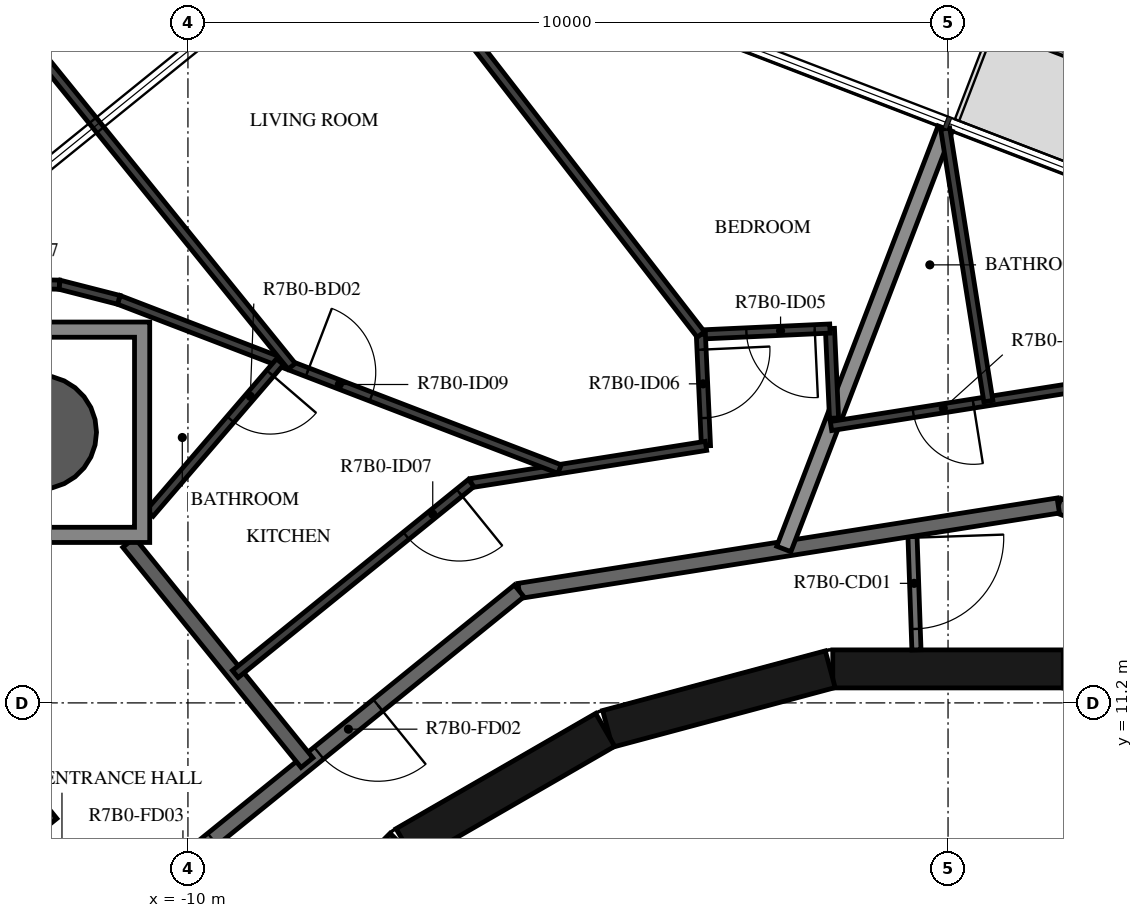
"""IFC4 building model, lengths in metres.
Left out: names, types, materials, properties, quantities, classifications, styles, units other than length and angle.
Written with IfcOpenShell. Run it as: python <this file> out.ifc"""

import sys

from ifc_helpers import new_model, si_unit, direction, frame, frame_2d, origin, origin_2d, place, context, subcontext, project, spatial, polyline, rectangle, hollow_circle, outline, extrude, element, fill, save


model = new_model("IFC4")
c1 = context("Model", 3, precision=1e-05, world=origin(), true_north=direction((0.0, 1.0)))
c2 = subcontext(c1, "Body", "Model", "MODEL_VIEW")
j1 = project(units=[si_unit("LENGTHUNIT", "METRE"), si_unit("PLANEANGLEUNIT", "RADIAN")], contexts=[c1])
p1 = place(None, origin())
s1 = spatial("IfcSite", under=j1, at=p1, CompositionType="ELEMENT")
p2 = place(p1, origin())
s2 = spatial("IfcBuilding", under=s1, at=p2, CompositionType="ELEMENT")
p3 = place(p2, frame((0.0, 0.0, 277.4)))
s3 = spatial("IfcBuildingStorey", under=s2, at=p3, CompositionType="ELEMENT", Elevation=277.4)
p4 = place(p3, frame((-11.953, 14.76, -0.38), z_axis=(0.0, 0.0, 1.0), x_axis=(1.0, 0.0, 0.0)))
e1 = element("IfcColumn", 1, at=p4, inside=s3, PredefinedType="COLUMN", context=c2, shape_type="SweptSolid", body=[
    extrude(hollow_circle(Radius=0.75, WallThickness=0.035, at=origin_2d()), origin(), (0.0, 0.0, 1.0), 3.5),
])
p5 = place(p3, frame((4.479, 10.858, 0.0), z_axis=(0.0, 0.0, 1.0), x_axis=(-0.965948410781, 0.258734743916, 0.0)))
e2 = element("IfcWall", 2, at=p5, inside=s3, PredefinedType="SHEAR", context=c2, shape_type="SweptSolid", body=[
    extrude(rectangle(XDim=3.033, YDim=0.5, at=frame_2d((1.516, 0.0))), origin(), (0.0, 0.0, 1.0), 3.12),
])
p6 = place(p5, frame((1.066, 0.0, 0.0)))
e3 = element("IfcOpeningElement", 3, at=p6, cuts=e2, PredefinedType="OPENING", context=c2, shape_type="SweptSolid", body=[
    extrude(rectangle(XDim=0.9, YDim=2.1, at=frame_2d((0.45, 1.05))), frame((0.0, 0.26, 0.0), z_axis=(0.0, -1.0, 0.0), x_axis=(1.0, 0.0, 0.0)), (0.0, 0.0, 1.0), 0.52),
])
for number, where, z_axis, x_axis in (
    (4, (1.516, 11.647, 0.0), (0.0, 0.0, 1.0), (-1.0, 0.0, 0.0)),
    (5, (-1.55, 11.643, 0.0), (0.0, 0.0, 1.0), (-0.966, -0.259, 0.0)),
    (6, (-4.51, 10.845, 0.0), (0.0, 0.0, 1.0), (-0.866, -0.5, 0.0)),
):
    element("IfcWall", number, at=place(p3, frame(where, z_axis=z_axis, x_axis=x_axis)), inside=s3, PredefinedType="SHEAR", context=c2, shape_type="SweptSolid", body=[
        extrude(rectangle(XDim=3.033, YDim=0.5, at=frame_2d((1.516, 0.0))), origin(), (0.0, 0.0, 1.0), 3.12),
    ])
p7 = place(p3, frame((-7.164, 9.308, 0.0), z_axis=(0.0, 0.0, 1.0), x_axis=(-0.707106781187, -0.707106781187, 0.0)))
e7 = element("IfcWall", 7, at=p7, inside=s3, PredefinedType="SHEAR", context=c2, shape_type="SweptSolid", body=[
    extrude(rectangle(XDim=3.032, YDim=0.5, at=frame_2d((1.516, 0.0))), origin(), (0.0, 0.0, 1.0), 3.12),
])
p8 = place(p7, frame((1.416, 0.0, 0.0)))
e8 = element("IfcOpeningElement", 8, at=p8, cuts=e7, PredefinedType="OPENING", context=c2, shape_type="SweptSolid", body=[
    extrude(rectangle(XDim=1.2, YDim=2.1, at=frame_2d((0.6, 1.05))), frame((0.0, 0.26, 0.0), z_axis=(0.0, -1.0, 0.0), x_axis=(1.0, 0.0, 0.0)), (0.0, 0.0, 1.0), 0.52),
])
p9 = place(p3, frame((-0.471, 13.492, 0.0), z_axis=(0.0, 0.0, 1.0), x_axis=(0.034873173869, -0.999391745886, 0.0)))
e9 = element("IfcWall", 9, at=p9, inside=s3, PredefinedType="PARTITIONING", context=c2, shape_type="SweptSolid", body=[
    extrude(rectangle(XDim=1.596, YDim=0.12, at=frame_2d((0.798, 0.0))), origin(), (0.0, 0.0, 1.0), 3.12),
])
p10 = place(p9, frame((0.12, 0.0, 0.0)))
e10 = element("IfcOpeningElement", 10, at=p10, cuts=e9, PredefinedType="OPENING", context=c2, shape_type="SweptSolid", body=[
    extrude(rectangle(XDim=1.2, YDim=2.1, at=frame_2d((0.6, 1.05))), frame((0.0, 0.07, 0.0), z_axis=(0.0, -1.0, 0.0), x_axis=(1.0, 0.0, 0.0)), (0.0, 0.0, 1.0), 0.14),
])
p11 = place(p3, frame((8.154, 11.223, 0.0), z_axis=(0.0, 0.0, 1.0), x_axis=(-0.93359073609, 0.358341090983, 0.0)))
e11 = element("IfcWall", 11, at=p11, inside=s3, PredefinedType="STANDARD", context=c2, shape_type="SweptSolid", body=[
    extrude(rectangle(XDim=7.181, YDim=0.2, at=frame_2d((3.59, 0.0))), origin(), (0.0, 0.0, 1.0), 3.12),
])
p12 = place(p3, frame((1.45, 13.797, 0.0), z_axis=(0.0, 0.0, 1.0), x_axis=(-0.987690361611, -0.156421704315, 0.0)))
e12 = element("IfcWall", 12, at=p12, inside=s3, PredefinedType="STANDARD", context=c2, shape_type="SweptSolid", body=[
    extrude(rectangle(XDim=7.181, YDim=0.2, at=frame_2d((3.591, 0.0))), origin(), (0.0, 0.0, 1.0), 3.12),
])
p13 = place(p3, frame((-5.643, 12.673, 0.0), z_axis=(0.0, 0.0, 1.0), x_axis=(-0.777160148113, -0.629302871585, 0.0)))
e13 = element("IfcWall", 13, at=p13, inside=s3, PredefinedType="STANDARD", context=c2, shape_type="SweptSolid", body=[
    extrude(rectangle(XDim=7.181, YDim=0.2, at=frame_2d((3.59, 0.0))), origin(), (0.0, 0.0, 1.0), 3.12),
])
p14 = place(p13, frame((2.39, 0.0, 0.0)))
e14 = element("IfcOpeningElement", 14, at=p14, cuts=e13, PredefinedType="OPENING", context=c2, shape_type="SweptSolid", body=[
    extrude(rectangle(XDim=1.0, YDim=2.1, at=frame_2d((0.5, 1.05))), frame((0.0, 0.11, 0.0), z_axis=(0.0, -1.0, 0.0), x_axis=(1.0, 0.0, 0.0)), (0.0, 0.0, 1.0), 0.22),
])
p15 = place(p13, frame((5.192, 0.0, 0.0)))
e15 = element("IfcOpeningElement", 15, at=p15, cuts=e13, PredefinedType="OPENING", context=c2, shape_type="SweptSolid", body=[
    extrude(rectangle(XDim=1.0, YDim=2.1, at=frame_2d((0.5, 1.05))), frame((0.0, 0.11, 0.0), z_axis=(0.0, -1.0, 0.0), x_axis=(1.0, 0.0, 0.0)), (0.0, 0.0, 1.0), 0.22),
])
p16 = place(p3, frame((-0.037, 18.756, 0.0), z_axis=(0.0, 0.0, 1.0), x_axis=(-0.358365943542, -0.933581196527, 0.0)))
e16 = element("IfcWall", 16, at=p16, inside=s3, PredefinedType="STANDARD", context=c2, shape_type="SweptSolid", body=[
    extrude(rectangle(XDim=5.924, YDim=0.2, at=frame_2d((2.962, 0.0))), origin(), (0.0, 0.0, 1.0), 2.73),
])
p17 = place(p3, frame((-10.779, 13.31, 0.0), z_axis=(0.0, 0.0, 1.0), x_axis=(0.62931692753, -0.777148766147, 0.0)))
e17 = element("IfcWall", 17, at=p17, inside=s3, PredefinedType="STANDARD", context=c2, shape_type="SweptSolid", body=[
    extrude(rectangle(XDim=3.727, YDim=0.2, at=frame_2d((1.864, 0.0))), origin(), (0.0, 0.0, 1.0), 3.12),
])
p18 = place(p3, frame((1.612, 15.341, 0.0), z_axis=(0.0, 0.0, 1.0), x_axis=(-0.987687176419, -0.156441815179, 0.0)))
e18 = element("IfcWall", 18, at=p18, inside=s3, PredefinedType="PARTITIONING", context=c2, shape_type="SweptSolid", body=[
    extrude(rectangle(XDim=3.191, YDim=0.12, at=frame_2d((1.596, 0.0))), origin(), (0.0, 0.0, 1.0), 3.12),
])
p19 = place(p18, frame((1.295, 0.0, 0.0)))
e19 = element("IfcOpeningElement", 19, at=p19, cuts=e18, PredefinedType="OPENING", context=c2, shape_type="SweptSolid", body=[
    extrude(rectangle(XDim=0.8, YDim=2.1, at=frame_2d((0.4, 1.05))), frame((0.0, 0.07, 0.0), z_axis=(0.0, -1.0, 0.0), x_axis=(1.0, 0.0, 0.0)), (0.0, 0.0, 1.0), 0.14),
])
p20 = place(p3, frame((-0.037, 18.756, 0.0), z_axis=(0.0, 0.0, 1.0), x_axis=(0.156421851095, -0.987690338365, 0.0)))
e20 = element("IfcWall", 20, at=p20, inside=s3, PredefinedType="PARTITIONING", context=c2, shape_type="SweptSolid", body=[
    extrude(rectangle(XDim=3.63, YDim=0.12, at=frame_2d((1.815, 0.0))), origin(), (0.0, 0.0, 1.0), 3.12),
])
p21 = place(p3, frame((-1.5, 14.946, 0.0), z_axis=(0.0, 0.0, 1.0), x_axis=(-0.045923747874, 0.998944948123, 0.0)))
e21 = element("IfcWall", 21, at=p21, inside=s3, PredefinedType="PARTITIONING", context=c2, shape_type="SweptSolid", body=[
    extrude(rectangle(XDim=1.18, YDim=0.12, at=frame_2d((0.59, 0.0))), origin(), (0.0, 0.0, 1.0), 3.12),
])
p22 = place(p3, frame((-1.554, 16.125, 0.0), z_axis=(0.0, 0.0, 1.0), x_axis=(-0.998943517875, -0.045954848436, 0.0)))
e22 = element("IfcWall", 22, at=p22, inside=s3, PredefinedType="PARTITIONING", context=c2, shape_type="SweptSolid", body=[
    extrude(rectangle(XDim=1.7, YDim=0.12, at=frame_2d((0.85, 0.0))), origin(), (0.0, 0.0, 1.0), 3.12),
])
p23 = place(p22, frame((0.2, 0.0, 0.0)))
e23 = element("IfcOpeningElement", 23, at=p23, cuts=e22, PredefinedType="OPENING", context=c2, shape_type="SweptSolid", body=[
    extrude(rectangle(XDim=0.9, YDim=2.1, at=frame_2d((0.45, 1.05))), frame((0.0, 0.07, 0.0), z_axis=(0.0, -1.0, 0.0), x_axis=(1.0, 0.0, 0.0)), (0.0, 0.0, 1.0), 0.14),
])
p24 = place(p3, frame((-3.252, 16.047, 0.0), z_axis=(0.0, 0.0, 1.0), x_axis=(0.045928493331, -0.998944729953, 0.0)))
e24 = element("IfcWall", 24, at=p24, inside=s3, PredefinedType="PARTITIONING", context=c2, shape_type="SweptSolid", body=[
    extrude(rectangle(XDim=1.467, YDim=0.12, at=frame_2d((0.733, 0.0))), origin(), (0.0, 0.0, 1.0), 3.12),
])
p25 = place(p24, frame((0.2, 0.0, 0.0)))
e25 = element("IfcOpeningElement", 25, at=p25, cuts=e24, PredefinedType="OPENING", context=c2, shape_type="SweptSolid", body=[
    extrude(rectangle(XDim=0.9, YDim=2.1, at=frame_2d((0.45, 1.05))), frame((0.0, 0.07, 0.0), z_axis=(0.0, -1.0, 0.0), x_axis=(1.0, 0.0, 0.0)), (0.0, 0.0, 1.0), 0.14),
])
p26 = place(p3, frame((-3.185, 14.581, 0.0), z_axis=(0.0, 0.0, 1.0), x_axis=(-0.987690712769, -0.156419486991, 0.0)))
e26 = element("IfcWall", 26, at=p26, inside=s3, PredefinedType="PARTITIONING", context=c2, shape_type="SweptSolid", body=[
    extrude(rectangle(XDim=3.128, YDim=0.12, at=frame_2d((1.564, 0.0))), origin(), (0.0, 0.0, 1.0), 3.12),
])
p27 = place(p3, frame((-6.274, 14.092, 0.0), z_axis=(0.0, 0.0, 1.0), x_axis=(-0.777162268892, -0.629300252511, 0.0)))
e27 = element("IfcWall", 27, at=p27, inside=s3, PredefinedType="PARTITIONING", context=c2, shape_type="SweptSolid", body=[
    extrude(rectangle(XDim=3.992, YDim=0.12, at=frame_2d((1.996, 0.0))), origin(), (0.0, 0.0, 1.0), 3.12),
])
p28 = place(p27, frame((0.2, 0.0, 0.0)))
e28 = element("IfcOpeningElement", 28, at=p28, cuts=e27, PredefinedType="OPENING", context=c2, shape_type="SweptSolid", body=[
    extrude(rectangle(XDim=0.9, YDim=2.1, at=frame_2d((0.45, 1.05))), frame((0.0, 0.07, 0.0), z_axis=(0.0, -1.0, 0.0), x_axis=(1.0, 0.0, 0.0)), (0.0, 0.0, 1.0), 0.14),
])
p29 = place(p3, frame((-7.606, 21.661, 0.0), z_axis=(0.0, 0.0, 1.0), x_axis=(0.612852858705, -0.79019704731, 0.0)))
e29 = element("IfcWall", 29, at=p29, inside=s3, PredefinedType="PARTITIONING", context=c2, shape_type="SweptSolid", body=[
    extrude(rectangle(XDim=7.105, YDim=0.12, at=frame_2d((3.552, 0.0))), origin(), (0.0, 0.0, 1.0), 3.12),
])
p30 = place(p3, frame((-10.91, 16.502, 0.0), z_axis=(0.0, 0.0, 1.0), x_axis=(0.933584453869, -0.358357457707, 0.0)))
e30 = element("IfcWall", 30, at=p30, inside=s3, PredefinedType="PARTITIONING", context=c2, shape_type="SweptSolid", body=[
    extrude(rectangle(XDim=6.212, YDim=0.12, at=frame_2d((3.106, 0.0))), origin(), (0.0, 0.0, 1.0), 3.12),
])
p31 = place(p30, frame((2.657, 0.0, 0.0)))
e31 = element("IfcOpeningElement", 31, at=p31, cuts=e30, PredefinedType="OPENING", context=c2, shape_type="SweptSolid", body=[
    extrude(rectangle(XDim=0.9, YDim=2.1, at=frame_2d((0.45, 1.05))), frame((0.0, 0.07, 0.0), z_axis=(0.0, -1.0, 0.0), x_axis=(1.0, 0.0, 0.0)), (0.0, 0.0, 1.0), 0.14),
])
p32 = place(p3, frame((-14.132, 22.418, 0.0), z_axis=(0.0, 0.0, 1.0), x_axis=(0.629309172704, -0.77715504576, 0.0)))
e32 = element("IfcWall", 32, at=p32, inside=s3, PredefinedType="PARTITIONING", context=c2, shape_type="SweptSolid", body=[
    extrude(rectangle(XDim=8.736, YDim=0.12, at=frame_2d((4.368, 0.0))), origin(), (0.0, 0.0, 1.0), 3.12),
])
p33 = place(p32, frame((0.4, 0.0, 0.0)))
e33 = element("IfcOpeningElement", 33, at=p33, cuts=e32, PredefinedType="OPENING", context=c2, shape_type="SweptSolid", body=[
    extrude(rectangle(XDim=0.9, YDim=2.1, at=frame_2d((0.45, 1.05))), frame((0.0, 0.07, 0.0), z_axis=(0.0, -1.0, 0.0), x_axis=(1.0, 0.0, 0.0)), (0.0, 0.0, 1.0), 0.14),
])
p34 = place(p3, frame((-8.788, 15.688, 0.0), z_axis=(0.0, 0.0, 1.0), x_axis=(-0.652090514391, -0.758141122115, 0.0)))
e34 = element("IfcWall", 34, at=p34, inside=s3, PredefinedType="PARTITIONING", context=c2, shape_type="SweptSolid", body=[
    extrude(rectangle(XDim=2.629, YDim=0.12, at=frame_2d((1.314, 0.0))), origin(), (0.0, 0.0, 1.0), 3.12),
])
p35 = place(p34, frame((0.2, 0.0, 0.0)))
e35 = element("IfcOpeningElement", 35, at=p35, cuts=e34, PredefinedType="OPENING", context=c2, shape_type="SweptSolid", body=[
    extrude(rectangle(XDim=0.8, YDim=2.1, at=frame_2d((0.4, 1.05))), frame((0.0, 0.07, 0.0), z_axis=(0.0, -1.0, 0.0), x_axis=(1.0, 0.0, 0.0)), (0.0, 0.0, 1.0), 0.14),
])
p36 = place(p3, frame((-10.91, 16.502, 0.0), z_axis=(0.0, 0.0, 1.0), x_axis=(-0.96886520615, 0.247588796823, 0.0)))
e36 = element("IfcWall", 36, at=p36, inside=s3, PredefinedType="PARTITIONING", context=c2, shape_type="SweptSolid", body=[
    extrude(rectangle(XDim=0.807, YDim=0.12, at=frame_2d((0.403, 0.0))), origin(), (0.0, 0.0, 1.0), 3.12),
])
p37 = place(p3, frame((-11.691, 16.702, 0.0), z_axis=(0.0, 0.0, 1.0), x_axis=(-0.999843155249, 0.017710587291, 0.0)))
e37 = element("IfcWall", 37, at=p37, inside=s3, PredefinedType="PARTITIONING", context=c2, shape_type="SweptSolid", body=[
    extrude(rectangle(XDim=0.455, YDim=0.12, at=frame_2d((0.228, 0.0))), origin(), (0.0, 0.0, 1.0), 3.12),
])
p38 = place(p3, frame((-13.901, 12.271, 0.0), z_axis=(0.0, 0.0, 1.0), x_axis=(0.62932066967, -0.777145735835, 0.0)))
e38 = element("IfcWall", 38, at=p38, inside=s3, PredefinedType="PARTITIONING", context=c2, shape_type="SweptSolid", body=[
    extrude(rectangle(XDim=3.384, YDim=0.12, at=frame_2d((1.692, 0.0))), origin(), (0.0, 0.0, 1.0), 3.12),
])
p39 = place(p38, frame((0.2, 0.0, 0.0)))
e39 = element("IfcOpeningElement", 39, at=p39, cuts=e38, PredefinedType="OPENING", context=c2, shape_type="SweptSolid", body=[
    extrude(rectangle(XDim=0.9, YDim=2.1, at=frame_2d((0.45, 1.05))), frame((0.0, 0.07, 0.0), z_axis=(0.0, -1.0, 0.0), x_axis=(1.0, 0.0, 0.0)), (0.0, 0.0, 1.0), 0.14),
])
p40 = place(p3, origin())
e40 = element("IfcWall", 40, at=p40, inside=s3, PredefinedType="STANDARD", context=c2, shape_type="SweptSolid", body=[
    extrude(outline(polyline([(-10.503, 16.21), (-10.503, 13.311), (-13.403, 13.311), (-13.403, 16.21), (-10.503, 16.21)]), holes=[polyline([(-13.203, 13.51), (-10.703, 13.51), (-10.703, 16.01), (-13.203, 16.01), (-13.203, 13.51)])]), origin(), (0.0, 0.0, 1.0), 3.12),
])
p41 = place(p19, origin())
e41 = element("IfcDoor", 41, at=p41, inside=s3, OperationType="SINGLE_SWING_RIGHT", PredefinedType="DOOR", context=c2, shape_type="SweptSolid", body=[
    extrude(rectangle(XDim=0.8, YDim=2.1, at=frame_2d((0.4, 1.05))), frame((0.0, 0.025, 0.0), z_axis=(0.0, -1.0, 0.0), x_axis=(1.0, 0.0, 0.0)), (0.0, 0.0, 1.0), 0.05),
])
fill(e19, e41)
p42 = place(p14, origin())
e42 = element("IfcDoor", 42, at=p42, inside=s3, OperationType="SINGLE_SWING_RIGHT", PredefinedType="DOOR", context=c2, shape_type="SweptSolid", body=[
    extrude(rectangle(XDim=1.0, YDim=2.1, at=frame_2d((0.5, 1.05))), frame((0.0, 0.025, 0.0), z_axis=(0.0, -1.0, 0.0), x_axis=(1.0, 0.0, 0.0)), (0.0, 0.0, 1.0), 0.05),
])
fill(e14, e42)
p43 = place(p23, origin())
e43 = element("IfcDoor", 43, at=p43, inside=s3, OperationType="SINGLE_SWING_RIGHT", PredefinedType="DOOR", context=c2, shape_type="SweptSolid", body=[
    extrude(rectangle(XDim=0.9, YDim=2.1, at=frame_2d((0.45, 1.05))), frame((0.0, 0.025, 0.0), z_axis=(0.0, -1.0, 0.0), x_axis=(1.0, 0.0, 0.0)), (0.0, 0.0, 1.0), 0.05),
])
fill(e23, e43)
p44 = place(p25, origin())
e44 = element("IfcDoor", 44, at=p44, inside=s3, OperationType="SINGLE_SWING_LEFT", PredefinedType="DOOR", context=c2, shape_type="SweptSolid", body=[
    extrude(rectangle(XDim=0.9, YDim=2.1, at=frame_2d((0.45, 1.05))), frame((0.0, 0.025, 0.0), z_axis=(0.0, -1.0, 0.0), x_axis=(1.0, 0.0, 0.0)), (0.0, 0.0, 1.0), 0.05),
])
fill(e25, e44)
p45 = place(p28, origin())
e45 = element("IfcDoor", 45, at=p45, inside=s3, OperationType="SINGLE_SWING_RIGHT", PredefinedType="DOOR", context=c2, shape_type="SweptSolid", body=[
    extrude(rectangle(XDim=0.9, YDim=2.1, at=frame_2d((0.45, 1.05))), frame((0.0, 0.025, 0.0), z_axis=(0.0, -1.0, 0.0), x_axis=(1.0, 0.0, 0.0)), (0.0, 0.0, 1.0), 0.05),
])
fill(e28, e45)
p46 = place(p35, origin())
e46 = element("IfcDoor", 46, at=p46, inside=s3, OperationType="SINGLE_SWING_RIGHT", PredefinedType="DOOR", context=c2, shape_type="SweptSolid", body=[
    extrude(rectangle(XDim=0.8, YDim=2.1, at=frame_2d((0.4, 1.05))), frame((0.0, 0.025, 0.0), z_axis=(0.0, -1.0, 0.0), x_axis=(1.0, 0.0, 0.0)), (0.0, 0.0, 1.0), 0.05),
])
fill(e35, e46)
p47 = place(p31, origin())
e47 = element("IfcDoor", 47, at=p47, inside=s3, OperationType="SINGLE_SWING_LEFT", PredefinedType="DOOR", context=c2, shape_type="SweptSolid", body=[
    extrude(rectangle(XDim=0.9, YDim=2.1, at=frame_2d((0.45, 1.05))), frame((0.0, 0.025, 0.0), z_axis=(0.0, -1.0, 0.0), x_axis=(1.0, 0.0, 0.0)), (0.0, 0.0, 1.0), 0.05),
])
fill(e31, e47)
p48 = place(p15, origin())
e48 = element("IfcDoor", 48, at=p48, inside=s3, OperationType="SINGLE_SWING_LEFT", PredefinedType="DOOR", context=c2, shape_type="SweptSolid", body=[
    extrude(rectangle(XDim=1.0, YDim=2.1, at=frame_2d((0.5, 1.05))), frame((0.0, 0.025, 0.0), z_axis=(0.0, -1.0, 0.0), x_axis=(1.0, 0.0, 0.0)), (0.0, 0.0, 1.0), 0.05),
])
fill(e15, e48)
p49 = place(p10, origin())
e49 = element("IfcDoor", 49, at=p49, inside=s3, OperationType="DOUBLE_DOOR_SINGLE_SWING", PredefinedType="DOOR", context=c2, shape_type="SweptSolid", body=[
    extrude(rectangle(XDim=1.2, YDim=2.1, at=frame_2d((0.6, 1.05))), frame((0.0, 0.025, 0.0), z_axis=(0.0, -1.0, 0.0), x_axis=(1.0, 0.0, 0.0)), (0.0, 0.0, 1.0), 0.05),
])
fill(e10, e49)
save(model, sys.argv[1])
